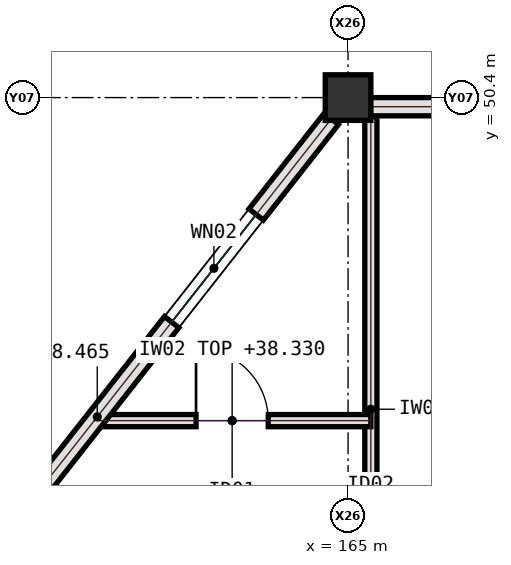
"""IFC4 building model, lengths in metres.
Left out: names, types, materials, properties, quantities, classifications, styles, units other than length and angle.
Written with IfcOpenShell. Run it as: python <this file> out.ifc"""

import sys

from ifc_helpers import new_model, si_unit, direction, frame, frame_2d, origin, origin_2d, place, context, subcontext, project, spatial, rectangle, extrude, element, fill, save


model = new_model("IFC4")
c1 = context("Model", 3, precision=1e-05, world=origin(), true_north=direction((0.0, 1.0)))
c2 = subcontext(c1, "Body", "Model", "MODEL_VIEW")
j1 = project(units=[si_unit("LENGTHUNIT", "METRE"), si_unit("PLANEANGLEUNIT", "RADIAN")], contexts=[c1])
p1 = place(None, origin())
s1 = spatial("IfcSite", under=j1, at=p1, CompositionType="ELEMENT")
p2 = place(p1, origin())
s2 = spatial("IfcBuilding", under=s1, at=p2, CompositionType="ELEMENT")
p3 = place(p2, frame((0.0, 0.0, 35.4)))
s3 = spatial("IfcBuildingStorey", under=s2, at=p3, CompositionType="ELEMENT", Elevation=35.4)
p4 = place(p3, frame((165.0, 50.4, 0.0), z_axis=(0.0, 0.0, 1.0), x_axis=(1.0, 0.0, 0.0)))
e1 = element("IfcColumn", 1, at=p4, inside=s3, PredefinedType="COLUMN", context=c2, shape_type="SweptSolid", body=[
    extrude(rectangle(XDim=0.6, YDim=0.6, at=origin_2d()), origin(), (0.0, 0.0, 1.0), 3.9),
])
p5 = place(p3, frame((165.3, 42.45, 0.0), z_axis=(0.0, 0.0, 1.0), x_axis=(0.0, 1.0, 0.0)))
e2 = element("IfcWall", 2, at=p5, inside=s3, PredefinedType="PARTITIONING", context=c2, shape_type="SweptSolid", body=[
    extrude(rectangle(XDim=7.7, YDim=0.16, at=frame_2d((3.85, 0.0))), origin(), (0.0, 0.0, 1.0), 2.93),
])
p6 = place(p5, frame((1.4, 0.0, 0.0)))
e3 = element("IfcOpeningElement", 3, at=p6, cuts=e2, PredefinedType="OPENING", context=c2, shape_type="SweptSolid", body=[
    extrude(rectangle(XDim=1.05, YDim=2.15, at=frame_2d((0.525, 1.075))), frame((0.0, 0.09, 0.0), z_axis=(0.0, -1.0, 0.0), x_axis=(1.0, 0.0, 0.0)), (0.0, 0.0, 1.0), 0.18),
])
p7 = place(p3, frame((161.65, 46.15, 0.0), z_axis=(0.0, 0.0, 1.0), x_axis=(1.0, 0.0, 0.0)))
e4 = element("IfcWall", 4, at=p7, inside=s3, PredefinedType="PARTITIONING", context=c2, shape_type="SweptSolid", body=[
    extrude(rectangle(XDim=3.65, YDim=0.16, at=frame_2d((1.825, 0.0))), origin(), (0.0, 0.0, 1.0), 2.93),
])
p8 = place(p7, frame((1.35, 0.0, 0.0)))
e5 = element("IfcOpeningElement", 5, at=p8, cuts=e4, PredefinedType="OPENING", context=c2, shape_type="SweptSolid", body=[
    extrude(rectangle(XDim=0.95, YDim=2.15, at=frame_2d((0.475, 1.075))), frame((0.0, 0.09, 0.0), z_axis=(0.0, -1.0, 0.0), x_axis=(1.0, 0.0, 0.0)), (0.0, 0.0, 1.0), 0.18),
])
p9 = place(p3, frame((171.305, 50.28, 0.0), z_axis=(0.0, 0.0, 1.0), x_axis=(-1.0, 0.0, 0.0)))
e6 = element("IfcWall", 6, at=p9, inside=s3, PredefinedType="SOLIDWALL", context=c2, shape_type="SweptSolid", body=[
    extrude(rectangle(XDim=6.01, YDim=0.24, at=frame_2d((3.005, 0.0))), origin(), (0.0, 0.0, 1.0), 3.015),
])
p10 = place(p9, frame((1.58, 0.0, 0.95)))
e7 = element("IfcOpeningElement", 7, at=p10, cuts=e6, PredefinedType="OPENING", context=c2, shape_type="SweptSolid", body=[
    extrude(rectangle(XDim=2.85, YDim=1.65, at=frame_2d((1.425, 0.825))), frame((0.0, 0.13, 0.0), z_axis=(0.0, -1.0, 0.0), x_axis=(1.0, 0.0, 0.0)), (0.0, 0.0, 1.0), 0.26),
])
p11 = place(p3, frame((158.62, 42.28, 0.0), z_axis=(0.0, 0.0, 1.0), x_axis=(0.617811819191, 0.786325985878, 0.0)))
e8 = element("IfcWall", 8, at=p11, inside=s3, PredefinedType="SOLIDWALL", context=c2, shape_type="SweptSolid", body=[
    extrude(rectangle(XDim=9.97, YDim=0.24, at=frame_2d((4.985, 0.0))), origin(), (0.0, 0.0, 1.0), 3.065),
])
p12 = place(p11, frame((1.6, 0.0, 0.95)))
e9 = element("IfcOpeningElement", 9, at=p12, cuts=e8, PredefinedType="OPENING", context=c2, shape_type="SweptSolid", body=[
    extrude(rectangle(XDim=1.8, YDim=1.6, at=frame_2d((0.9, 0.8))), frame((0.0, 0.13, 0.0), z_axis=(0.0, -1.0, 0.0), x_axis=(1.0, 0.0, 0.0)), (0.0, 0.0, 1.0), 0.26),
])
p13 = place(p11, frame((6.57, 0.0, 0.95)))
e10 = element("IfcOpeningElement", 10, at=p13, cuts=e8, PredefinedType="OPENING", context=c2, shape_type="SweptSolid", body=[
    extrude(rectangle(XDim=1.8, YDim=1.6, at=frame_2d((0.9, 0.8))), frame((0.0, 0.13, 0.0), z_axis=(0.0, -1.0, 0.0), x_axis=(1.0, 0.0, 0.0)), (0.0, 0.0, 1.0), 0.26),
])
p14 = place(p8, origin())
e11 = element("IfcDoor", 11, at=p14, inside=s3, OperationType="SINGLE_SWING_LEFT", PredefinedType="DOOR", context=c2, shape_type="SweptSolid", body=[
    extrude(rectangle(XDim=0.95, YDim=2.15, at=frame_2d((0.475, 1.075))), frame((0.0, 0.025, 0.0), z_axis=(0.0, -1.0, 0.0), x_axis=(1.0, 0.0, 0.0)), (0.0, 0.0, 1.0), 0.05),
])
fill(e5, e11)
p15 = place(p13, origin())
e12 = element("IfcWindow", 12, at=p15, inside=s3, PartitioningType="SINGLE_PANEL", PredefinedType="WINDOW", context=c2, shape_type="SweptSolid", body=[
    extrude(rectangle(XDim=1.8, YDim=1.6, at=frame_2d((0.9, 0.8))), frame((0.0, 0.03, 0.0), z_axis=(0.0, -1.0, 0.0), x_axis=(1.0, 0.0, 0.0)), (0.0, 0.0, 1.0), 0.06),
])
fill(e10, e12)
save(model, sys.argv[1])
